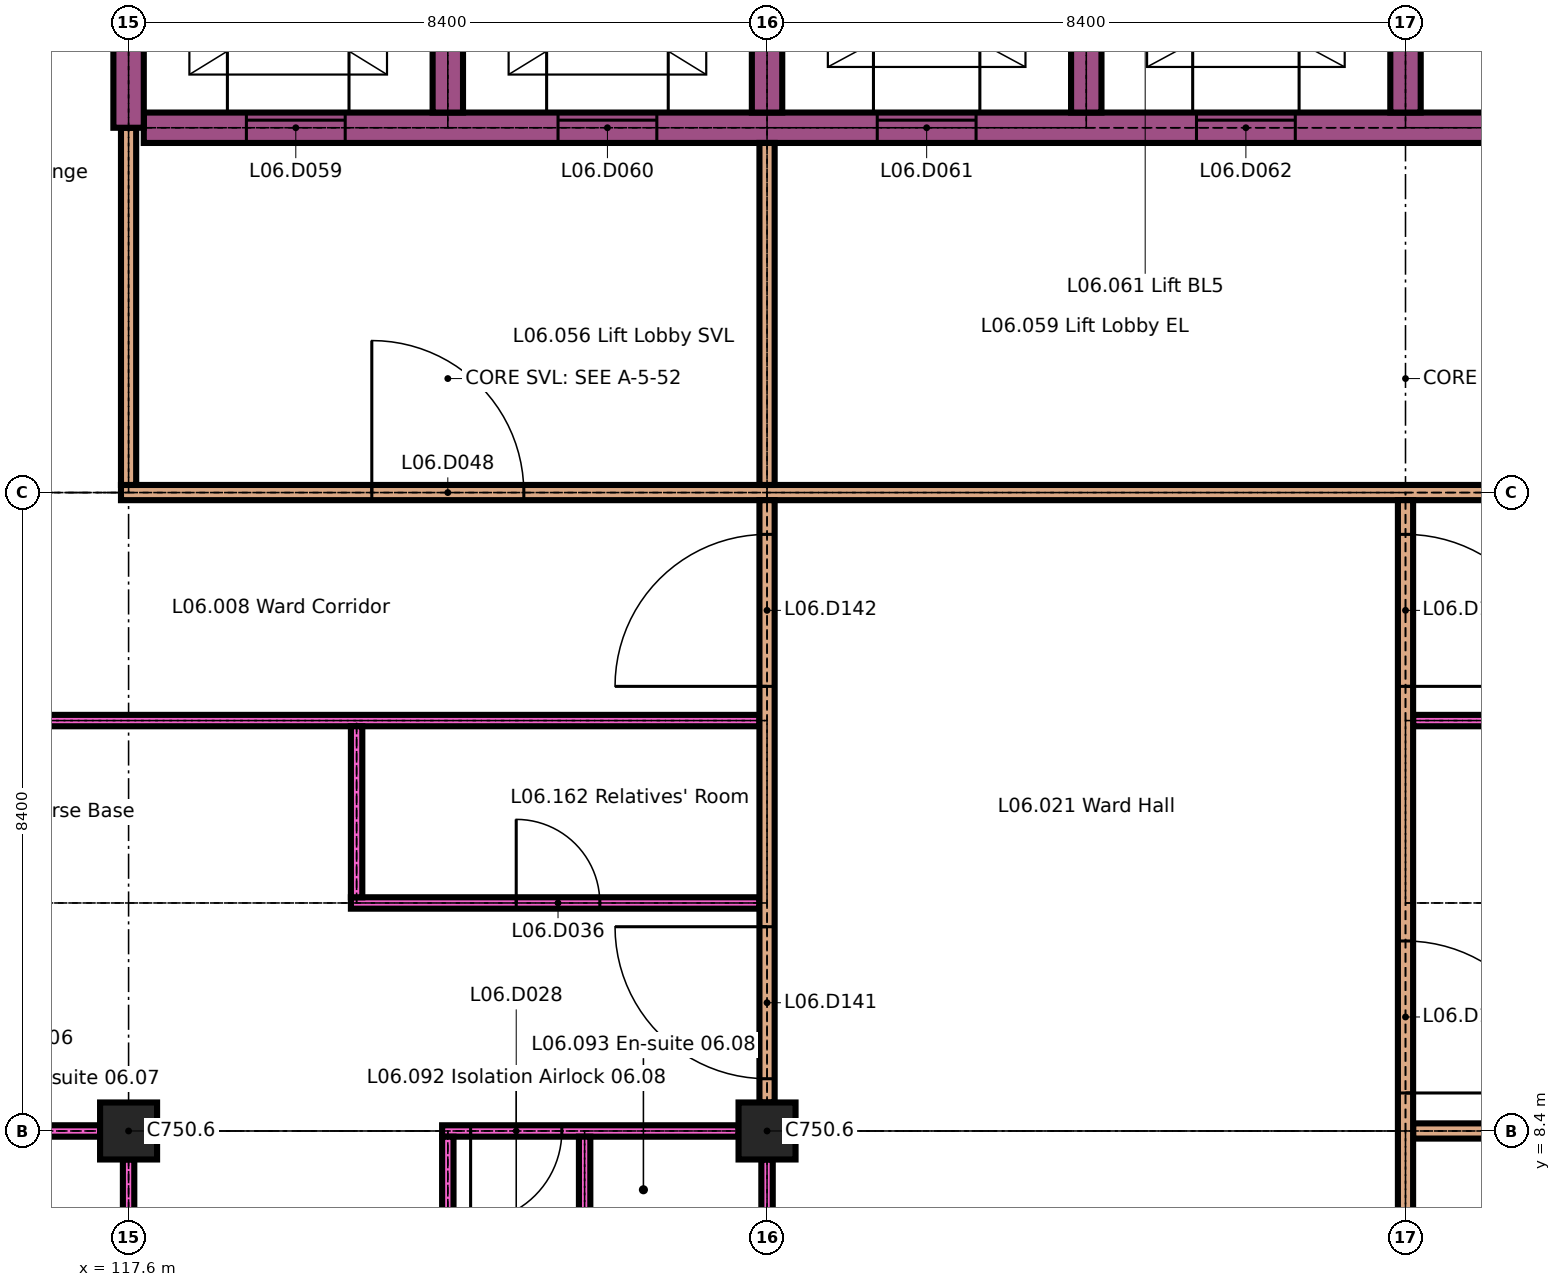
"""IFC4 building model, lengths in metres.
Left out: names, types, materials, properties, quantities, classifications, styles, units other than length and angle.
Written with IfcOpenShell. Run it as: python <this file> out.ifc"""

import sys

from ifc_helpers import new_model, si_unit, direction, frame, frame_2d, origin, origin_2d, place, context, subcontext, project, spatial, rectangle, extrude, element, fill, save


model = new_model("IFC4")
c1 = context("Model", 3, precision=1e-05, world=origin(), true_north=direction((0.0, 1.0)))
c2 = subcontext(c1, "Body", "Model", "MODEL_VIEW")
j1 = project(units=[si_unit("LENGTHUNIT", "METRE"), si_unit("PLANEANGLEUNIT", "RADIAN")], contexts=[c1])
p1 = place(None, origin())
s1 = spatial("IfcSite", under=j1, at=p1, CompositionType="ELEMENT")
p2 = place(p1, origin())
s2 = spatial("IfcBuilding", under=s1, at=p2, CompositionType="ELEMENT")
p3 = place(p2, frame((0.0, 0.0, 26.1)))
s3 = spatial("IfcBuildingStorey", under=s2, at=p3, CompositionType="ELEMENT", Elevation=26.1)
for number, where, z_axis, x_axis in (
    (1, (117.6, 8.4, 0.0), (0.0, 0.0, 1.0), (1.0, 0.0, 0.0)),
    (2, (126.0, 8.4, 0.0), (0.0, 0.0, 1.0), (1.0, 0.0, 0.0)),
):
    element("IfcColumn", number, at=place(p3, frame(where, z_axis=z_axis, x_axis=x_axis)), inside=s3, PredefinedType="COLUMN", context=c2, shape_type="SweptSolid", body=[
        extrude(rectangle(XDim=0.75, YDim=0.75, at=origin_2d()), origin(), (0.0, 0.0, 1.0), 3.3),
    ])
p4 = place(p3, frame((109.2, 8.4, 0.0), z_axis=(0.0, 0.0, 1.0), x_axis=(1.0, 0.0, 0.0)))
e3 = element("IfcWall", 3, at=p4, inside=s3, PredefinedType="PARTITIONING", context=c2, shape_type="SweptSolid", body=[
    extrude(rectangle(XDim=8.025, YDim=0.15, at=frame_2d((4.013, 0.0))), origin(), (0.0, 0.0, 1.0), 3.3),
])
p5 = place(p4, frame((2.7, 0.0, 0.0)))
e4 = element("IfcOpeningElement", 4, at=p5, cuts=e3, PredefinedType="OPENING", context=c2, shape_type="SweptSolid", body=[
    extrude(rectangle(XDim=1.2, YDim=2.1, at=frame_2d((0.6, 1.05))), frame((0.0, 0.085, 0.0), z_axis=(0.0, -1.0, 0.0), x_axis=(1.0, 0.0, 0.0)), (0.0, 0.0, 1.0), 0.17),
])
p6 = place(p4, frame((4.45, 0.0, 0.0)))
e5 = element("IfcOpeningElement", 5, at=p6, cuts=e3, PredefinedType="OPENING", context=c2, shape_type="SweptSolid", body=[
    extrude(rectangle(XDim=1.5, YDim=2.4, at=frame_2d((0.75, 1.2))), frame((0.0, 0.085, 0.0), z_axis=(0.0, -1.0, 0.0), x_axis=(1.0, 0.0, 0.0)), (0.0, 0.0, 1.0), 0.17),
])
p7 = place(p3, frame((121.725, 8.4, 0.0), z_axis=(0.0, 0.0, 1.0), x_axis=(1.0, 0.0, 0.0)))
e6 = element("IfcWall", 6, at=p7, inside=s3, PredefinedType="PARTITIONING", context=c2, shape_type="SweptSolid", body=[
    extrude(rectangle(XDim=3.9, YDim=0.15, at=frame_2d((1.95, 0.0))), origin(), (0.0, 0.0, 1.0), 3.3),
])
p8 = place(p7, frame((0.375, 0.0, 0.0)))
e7 = element("IfcOpeningElement", 7, at=p8, cuts=e6, PredefinedType="OPENING", context=c2, shape_type="SweptSolid", body=[
    extrude(rectangle(XDim=1.2, YDim=2.1, at=frame_2d((0.6, 1.05))), frame((0.0, 0.085, 0.0), z_axis=(0.0, -1.0, 0.0), x_axis=(1.0, 0.0, 0.0)), (0.0, 0.0, 1.0), 0.17),
])
p9 = place(p3, frame((134.5, 8.4, 0.0), z_axis=(0.0, 0.0, 1.0), x_axis=(1.0, 0.0, 0.0)))
e8 = element("IfcWall", 8, at=p9, inside=s3, PredefinedType="PARTITIONING", context=c2, shape_type="SweptSolid", body=[
    extrude(rectangle(XDim=8.3, YDim=0.2, at=frame_2d((4.15, 0.0))), origin(), (0.0, 0.0, 1.0), 3.3),
])
p10 = place(p9, frame((3.15, 0.0, 0.0)))
e9 = element("IfcOpeningElement", 9, at=p10, cuts=e8, PredefinedType="OPENING", context=c2, shape_type="SweptSolid", body=[
    extrude(rectangle(XDim=2.0, YDim=2.4, at=frame_2d((1.0, 1.2))), frame((0.0, 0.11, 0.0), z_axis=(0.0, -1.0, 0.0), x_axis=(1.0, 0.0, 0.0)), (0.0, 0.0, 1.0), 0.22),
])
p11 = place(p3, frame((120.525, 11.4, 0.0), z_axis=(0.0, 0.0, 1.0), x_axis=(1.0, 0.0, 0.0)))
e10 = element("IfcWall", 10, at=p11, inside=s3, PredefinedType="PARTITIONING", context=c2, shape_type="SweptSolid", body=[
    extrude(rectangle(XDim=5.375, YDim=0.15, at=frame_2d((2.688, 0.0))), origin(), (0.0, 0.0, 1.0), 3.3),
])
p12 = place(p11, frame((2.175, 0.0, 0.0)))
e11 = element("IfcOpeningElement", 11, at=p12, cuts=e10, PredefinedType="OPENING", context=c2, shape_type="SweptSolid", body=[
    extrude(rectangle(XDim=1.1, YDim=2.1, at=frame_2d((0.55, 1.05))), frame((0.0, 0.085, 0.0), z_axis=(0.0, -1.0, 0.0), x_axis=(1.0, 0.0, 0.0)), (0.0, 0.0, 1.0), 0.17),
])
p13 = place(p3, frame((112.125, 13.8, 0.0), z_axis=(0.0, 0.0, 1.0), x_axis=(1.0, 0.0, 0.0)))
e12 = element("IfcWall", 12, at=p13, inside=s3, PredefinedType="PARTITIONING", context=c2, shape_type="SweptSolid", body=[
    extrude(rectangle(XDim=13.775, YDim=0.15, at=frame_2d((6.887, 0.0))), origin(), (0.0, 0.0, 1.0), 3.3),
])
p14 = place(p3, frame((134.5, 13.8, 0.0), z_axis=(0.0, 0.0, 1.0), x_axis=(1.0, 0.0, 0.0)))
e13 = element("IfcWall", 13, at=p14, inside=s3, PredefinedType="PARTITIONING", context=c2, shape_type="SweptSolid", body=[
    extrude(rectangle(XDim=16.6, YDim=0.15, at=frame_2d((8.3, 0.0))), origin(), (0.0, 0.0, 1.0), 3.3),
])
p15 = place(p14, frame((9.8, 0.0, 0.0)))
e14 = element("IfcOpeningElement", 14, at=p15, cuts=e13, PredefinedType="OPENING", context=c2, shape_type="SweptSolid", body=[
    extrude(rectangle(XDim=1.2, YDim=2.1, at=frame_2d((0.6, 1.05))), frame((0.0, 0.085, 0.0), z_axis=(0.0, -1.0, 0.0), x_axis=(1.0, 0.0, 0.0)), (0.0, 0.0, 1.0), 0.17),
])
p16 = place(p14, frame((13.95, 0.0, 0.0)))
e15 = element("IfcOpeningElement", 15, at=p16, cuts=e13, PredefinedType="OPENING", context=c2, shape_type="SweptSolid", body=[
    extrude(rectangle(XDim=1.2, YDim=2.1, at=frame_2d((0.6, 1.05))), frame((0.0, 0.085, 0.0), z_axis=(0.0, -1.0, 0.0), x_axis=(1.0, 0.0, 0.0)), (0.0, 0.0, 1.0), 0.17),
])
p17 = place(p3, frame((117.5, 16.8, 0.0), z_axis=(0.0, 0.0, 1.0), x_axis=(1.0, 0.0, 0.0)))
e16 = element("IfcWall", 16, at=p17, inside=s3, PredefinedType="PARTITIONING", context=c2, shape_type="SweptSolid", body=[
    extrude(rectangle(XDim=25.3, YDim=0.2, at=frame_2d((12.65, 0.0))), origin(), (0.0, 0.0, 1.0), 3.3),
])
p18 = place(p17, frame((3.3, 0.0, 0.0)))
e17 = element("IfcOpeningElement", 17, at=p18, cuts=e16, PredefinedType="OPENING", context=c2, shape_type="SweptSolid", body=[
    extrude(rectangle(XDim=2.0, YDim=2.4, at=frame_2d((1.0, 1.2))), frame((0.0, 0.11, 0.0), z_axis=(0.0, -1.0, 0.0), x_axis=(1.0, 0.0, 0.0)), (0.0, 0.0, 1.0), 0.22),
])
p19 = place(p17, frame((20.1, 0.0, 0.0)))
e18 = element("IfcOpeningElement", 18, at=p19, cuts=e16, PredefinedType="OPENING", context=c2, shape_type="SweptSolid", body=[
    extrude(rectangle(XDim=2.0, YDim=2.4, at=frame_2d((1.0, 1.2))), frame((0.0, 0.11, 0.0), z_axis=(0.0, -1.0, 0.0), x_axis=(1.0, 0.0, 0.0)), (0.0, 0.0, 1.0), 0.22),
])
p20 = place(p3, frame((117.8, 21.6, 0.0), z_axis=(0.0, 0.0, 1.0), x_axis=(1.0, 0.0, 0.0)))
e19 = element("IfcWall", 19, at=p20, inside=s3, PredefinedType="SHEAR", context=c2, shape_type="SweptSolid", body=[
    extrude(rectangle(XDim=24.8, YDim=0.4, at=frame_2d((12.4, 0.0))), origin(), (0.0, 0.0, 1.0), 3.3),
])
p21 = place(p20, frame((1.35, 0.0, 0.0)))
e20 = element("IfcOpeningElement", 20, at=p21, cuts=e19, PredefinedType="OPENING", context=c2, shape_type="SweptSolid", body=[
    extrude(rectangle(XDim=1.3, YDim=2.1, at=frame_2d((0.65, 1.05))), frame((0.0, 0.21, 0.0), z_axis=(0.0, -1.0, 0.0), x_axis=(1.0, 0.0, 0.0)), (0.0, 0.0, 1.0), 0.42),
])
p22 = place(p20, frame((5.45, 0.0, 0.0)))
e21 = element("IfcOpeningElement", 21, at=p22, cuts=e19, PredefinedType="OPENING", context=c2, shape_type="SweptSolid", body=[
    extrude(rectangle(XDim=1.3, YDim=2.1, at=frame_2d((0.65, 1.05))), frame((0.0, 0.21, 0.0), z_axis=(0.0, -1.0, 0.0), x_axis=(1.0, 0.0, 0.0)), (0.0, 0.0, 1.0), 0.42),
])
p23 = place(p20, frame((9.65, 0.0, 0.0)))
e22 = element("IfcOpeningElement", 22, at=p23, cuts=e19, PredefinedType="OPENING", context=c2, shape_type="SweptSolid", body=[
    extrude(rectangle(XDim=1.3, YDim=2.1, at=frame_2d((0.65, 1.05))), frame((0.0, 0.21, 0.0), z_axis=(0.0, -1.0, 0.0), x_axis=(1.0, 0.0, 0.0)), (0.0, 0.0, 1.0), 0.42),
])
p24 = place(p20, frame((13.85, 0.0, 0.0)))
e23 = element("IfcOpeningElement", 23, at=p24, cuts=e19, PredefinedType="OPENING", context=c2, shape_type="SweptSolid", body=[
    extrude(rectangle(XDim=1.3, YDim=2.1, at=frame_2d((0.65, 1.05))), frame((0.0, 0.21, 0.0), z_axis=(0.0, -1.0, 0.0), x_axis=(1.0, 0.0, 0.0)), (0.0, 0.0, 1.0), 0.42),
])
p25 = place(p20, frame((18.15, 0.0, 0.0)))
e24 = element("IfcOpeningElement", 24, at=p25, cuts=e19, PredefinedType="OPENING", context=c2, shape_type="SweptSolid", body=[
    extrude(rectangle(XDim=1.1, YDim=2.1, at=frame_2d((0.55, 1.05))), frame((0.0, 0.21, 0.0), z_axis=(0.0, -1.0, 0.0), x_axis=(1.0, 0.0, 0.0)), (0.0, 0.0, 1.0), 0.42),
])
p26 = place(p20, frame((22.25, 0.0, 0.0)))
e25 = element("IfcOpeningElement", 25, at=p26, cuts=e19, PredefinedType="OPENING", context=c2, shape_type="SweptSolid", body=[
    extrude(rectangle(XDim=1.1, YDim=2.1, at=frame_2d((0.55, 1.05))), frame((0.0, 0.21, 0.0), z_axis=(0.0, -1.0, 0.0), x_axis=(1.0, 0.0, 0.0)), (0.0, 0.0, 1.0), 0.42),
])
p27 = place(p3, frame((117.6, 0.375, 0.0), z_axis=(0.0, 0.0, 1.0), x_axis=(0.0, 1.0, 0.0)))
e26 = element("IfcWall", 26, at=p27, inside=s3, PredefinedType="PARTITIONING", context=c2, shape_type="SweptSolid", body=[
    extrude(rectangle(XDim=7.65, YDim=0.15, at=frame_2d((3.825, 0.0))), origin(), (0.0, 0.0, 1.0), 3.3),
])
p28 = place(p3, frame((117.6, 16.9, 0.0), z_axis=(0.0, 0.0, 1.0), x_axis=(0.0, 1.0, 0.0)))
e27 = element("IfcWall", 27, at=p28, inside=s3, PredefinedType="PARTITIONING", context=c2, shape_type="SweptSolid", body=[
    extrude(rectangle(XDim=4.7, YDim=0.2, at=frame_2d((2.35, 0.0))), origin(), (0.0, 0.0, 1.0), 3.3),
])
p29 = place(p3, frame((117.6, 21.6, 0.0), z_axis=(0.0, 0.0, 1.0), x_axis=(0.0, 1.0, 0.0)))
e28 = element("IfcWall", 28, at=p29, inside=s3, PredefinedType="SHEAR", context=c2, shape_type="SweptSolid", body=[
    extrude(rectangle(XDim=3.45, YDim=0.4, at=frame_2d((1.725, 0.0))), origin(), (0.0, 0.0, 1.0), 3.3),
])
p30 = place(p3, frame((120.6, 11.475, 0.0), z_axis=(0.0, 0.0, 1.0), x_axis=(0.0, 1.0, 0.0)))
e29 = element("IfcWall", 29, at=p30, inside=s3, PredefinedType="PARTITIONING", context=c2, shape_type="SweptSolid", body=[
    extrude(rectangle(XDim=2.25, YDim=0.15, at=frame_2d((1.125, 0.0))), origin(), (0.0, 0.0, 1.0), 3.3),
])
p31 = place(p3, frame((121.8, 0.15, 0.0), z_axis=(0.0, 0.0, 1.0), x_axis=(0.0, 1.0, 0.0)))
e30 = element("IfcWall", 30, at=p31, inside=s3, PredefinedType="PARTITIONING", context=c2, shape_type="SweptSolid", body=[
    extrude(rectangle(XDim=8.175, YDim=0.15, at=frame_2d((4.087, 0.0))), origin(), (0.0, 0.0, 1.0), 3.3),
])
p32 = place(p3, frame((121.8, 21.8, 0.0), z_axis=(0.0, 0.0, 1.0), x_axis=(0.0, 1.0, 0.0)))
e31 = element("IfcWall", 31, at=p32, inside=s3, PredefinedType="SHEAR", context=c2, shape_type="SweptSolid", body=[
    extrude(rectangle(XDim=3.25, YDim=0.4, at=frame_2d((1.625, 0.0))), origin(), (0.0, 0.0, 1.0), 3.3),
])
p33 = place(p3, frame((123.6, 6.075, 0.0), z_axis=(0.0, 0.0, 1.0), x_axis=(0.0, 1.0, 0.0)))
e32 = element("IfcWall", 32, at=p33, inside=s3, PredefinedType="PARTITIONING", context=c2, shape_type="SweptSolid", body=[
    extrude(rectangle(XDim=2.25, YDim=0.15, at=frame_2d((1.125, 0.0))), origin(), (0.0, 0.0, 1.0), 3.3),
])
p34 = place(p3, frame((126.0, 0.375, 0.0), z_axis=(0.0, 0.0, 1.0), x_axis=(0.0, 1.0, 0.0)))
e33 = element("IfcWall", 33, at=p34, inside=s3, PredefinedType="PARTITIONING", context=c2, shape_type="SweptSolid", body=[
    extrude(rectangle(XDim=7.65, YDim=0.15, at=frame_2d((3.825, 0.0))), origin(), (0.0, 0.0, 1.0), 3.3),
])
p35 = place(p3, frame((126.0, 8.775, 0.0), z_axis=(0.0, 0.0, 1.0), x_axis=(0.0, 1.0, 0.0)))
e34 = element("IfcWall", 34, at=p35, inside=s3, PredefinedType="PARTITIONING", context=c2, shape_type="SweptSolid", body=[
    extrude(rectangle(XDim=7.925, YDim=0.2, at=frame_2d((3.962, 0.0))), origin(), (0.0, 0.0, 1.0), 3.3),
])
p36 = place(p35, frame((0.312, 0.0, 0.0)))
e35 = element("IfcOpeningElement", 35, at=p36, cuts=e34, PredefinedType="OPENING", context=c2, shape_type="SweptSolid", body=[
    extrude(rectangle(XDim=2.0, YDim=2.4, at=frame_2d((1.0, 1.2))), frame((0.0, 0.11, 0.0), z_axis=(0.0, -1.0, 0.0), x_axis=(1.0, 0.0, 0.0)), (0.0, 0.0, 1.0), 0.22),
])
p37 = place(p35, frame((5.475, 0.0, 0.0)))
e36 = element("IfcOpeningElement", 36, at=p37, cuts=e34, PredefinedType="OPENING", context=c2, shape_type="SweptSolid", body=[
    extrude(rectangle(XDim=2.0, YDim=2.4, at=frame_2d((1.0, 1.2))), frame((0.0, 0.11, 0.0), z_axis=(0.0, -1.0, 0.0), x_axis=(1.0, 0.0, 0.0)), (0.0, 0.0, 1.0), 0.22),
])
p38 = place(p3, frame((126.0, 16.9, 0.0), z_axis=(0.0, 0.0, 1.0), x_axis=(0.0, 1.0, 0.0)))
e37 = element("IfcWall", 37, at=p38, inside=s3, PredefinedType="PARTITIONING", context=c2, shape_type="SweptSolid", body=[
    extrude(rectangle(XDim=4.5, YDim=0.2, at=frame_2d((2.25, 0.0))), origin(), (0.0, 0.0, 1.0), 3.3),
])
for number, where, z_axis, x_axis in (
    (38, (126.0, 21.8, 0.0), (0.0, 0.0, 1.0), (0.0, 1.0, 0.0)),
    (39, (130.2, 21.8, 0.0), (0.0, 0.0, 1.0), (0.0, 1.0, 0.0)),
):
    element("IfcWall", number, at=place(p3, frame(where, z_axis=z_axis, x_axis=x_axis)), inside=s3, PredefinedType="SHEAR", context=c2, shape_type="SweptSolid", body=[
        extrude(rectangle(XDim=3.25, YDim=0.4, at=frame_2d((1.625, 0.0))), origin(), (0.0, 0.0, 1.0), 3.3),
    ])
p39 = place(p3, frame((134.4, 3.6, 0.0), z_axis=(0.0, 0.0, 1.0), x_axis=(0.0, 1.0, 0.0)))
e40 = element("IfcWall", 40, at=p39, inside=s3, PredefinedType="PARTITIONING", context=c2, shape_type="SweptSolid", body=[
    extrude(rectangle(XDim=13.1, YDim=0.2, at=frame_2d((6.55, 0.0))), origin(), (0.0, 0.0, 1.0), 3.3),
])
p40 = place(p39, frame((5.3, 0.0, 0.0)))
e41 = element("IfcOpeningElement", 41, at=p40, cuts=e40, PredefinedType="OPENING", context=c2, shape_type="SweptSolid", body=[
    extrude(rectangle(XDim=2.0, YDim=2.4, at=frame_2d((1.0, 1.2))), frame((0.0, 0.11, 0.0), z_axis=(0.0, -1.0, 0.0), x_axis=(1.0, 0.0, 0.0)), (0.0, 0.0, 1.0), 0.22),
])
p41 = place(p39, frame((10.65, 0.0, 0.0)))
e42 = element("IfcOpeningElement", 42, at=p41, cuts=e40, PredefinedType="OPENING", context=c2, shape_type="SweptSolid", body=[
    extrude(rectangle(XDim=2.0, YDim=2.4, at=frame_2d((1.0, 1.2))), frame((0.0, 0.11, 0.0), z_axis=(0.0, -1.0, 0.0), x_axis=(1.0, 0.0, 0.0)), (0.0, 0.0, 1.0), 0.22),
])
p42 = place(p3, frame((134.4, 21.8, 0.0), z_axis=(0.0, 0.0, 1.0), x_axis=(0.0, 1.0, 0.0)))
e43 = element("IfcWall", 43, at=p42, inside=s3, PredefinedType="SHEAR", context=c2, shape_type="SweptSolid", body=[
    extrude(rectangle(XDim=3.25, YDim=0.4, at=frame_2d((1.625, 0.0))), origin(), (0.0, 0.0, 1.0), 3.3),
])
p43 = place(p8, origin())
e44 = element("IfcDoor", 44, at=p43, inside=s3, OperationType="SINGLE_SWING_LEFT", PredefinedType="DOOR", context=c2, shape_type="SweptSolid", body=[
    extrude(rectangle(XDim=1.2, YDim=2.1, at=frame_2d((0.6, 1.05))), frame((0.0, 0.05, 0.0), z_axis=(0.0, -1.0, 0.0), x_axis=(1.0, 0.0, 0.0)), (0.0, 0.0, 1.0), 0.1),
])
fill(e7, e44)
p44 = place(p12, origin())
e45 = element("IfcDoor", 45, at=p44, inside=s3, OperationType="SINGLE_SWING_RIGHT", PredefinedType="DOOR", context=c2, shape_type="SweptSolid", body=[
    extrude(rectangle(XDim=1.1, YDim=2.1, at=frame_2d((0.55, 1.05))), frame((0.0, 0.025, 0.0), z_axis=(0.0, -1.0, 0.0), x_axis=(1.0, 0.0, 0.0)), (0.0, 0.0, 1.0), 0.05),
])
fill(e11, e45)
p45 = place(p18, origin())
e46 = element("IfcDoor", 46, at=p45, inside=s3, OperationType="SINGLE_SWING_RIGHT", PredefinedType="DOOR", context=c2, shape_type="SweptSolid", body=[
    extrude(rectangle(XDim=2.0, YDim=2.4, at=frame_2d((1.0, 1.2))), frame((0.0, 0.03, 0.0), z_axis=(0.0, -1.0, 0.0), x_axis=(1.0, 0.0, 0.0)), (0.0, 0.0, 1.0), 0.06),
])
fill(e17, e46)
p46 = place(p21, origin())
e47 = element("IfcDoor", 47, at=p46, inside=s3, OperationType="SLIDING_TO_LEFT", PredefinedType="DOOR", context=c2, shape_type="SweptSolid", body=[
    extrude(rectangle(XDim=1.3, YDim=2.1, at=frame_2d((0.65, 1.05))), frame((0.0, 0.025, 0.0), z_axis=(0.0, -1.0, 0.0), x_axis=(1.0, 0.0, 0.0)), (0.0, 0.0, 1.0), 0.05),
])
fill(e20, e47)
p47 = place(p22, origin())
e48 = element("IfcDoor", 48, at=p47, inside=s3, OperationType="SLIDING_TO_LEFT", PredefinedType="DOOR", context=c2, shape_type="SweptSolid", body=[
    extrude(rectangle(XDim=1.3, YDim=2.1, at=frame_2d((0.65, 1.05))), frame((0.0, 0.025, 0.0), z_axis=(0.0, -1.0, 0.0), x_axis=(1.0, 0.0, 0.0)), (0.0, 0.0, 1.0), 0.05),
])
fill(e21, e48)
p48 = place(p23, origin())
e49 = element("IfcDoor", 49, at=p48, inside=s3, OperationType="SLIDING_TO_LEFT", PredefinedType="DOOR", context=c2, shape_type="SweptSolid", body=[
    extrude(rectangle(XDim=1.3, YDim=2.1, at=frame_2d((0.65, 1.05))), frame((0.0, 0.025, 0.0), z_axis=(0.0, -1.0, 0.0), x_axis=(1.0, 0.0, 0.0)), (0.0, 0.0, 1.0), 0.05),
])
fill(e22, e49)
p49 = place(p24, origin())
e50 = element("IfcDoor", 50, at=p49, inside=s3, OperationType="SLIDING_TO_LEFT", PredefinedType="DOOR", context=c2, shape_type="SweptSolid", body=[
    extrude(rectangle(XDim=1.3, YDim=2.1, at=frame_2d((0.65, 1.05))), frame((0.0, 0.025, 0.0), z_axis=(0.0, -1.0, 0.0), x_axis=(1.0, 0.0, 0.0)), (0.0, 0.0, 1.0), 0.05),
])
fill(e23, e50)
p50 = place(p36, origin())
e51 = element("IfcDoor", 51, at=p50, inside=s3, OperationType="SINGLE_SWING_LEFT", PredefinedType="DOOR", context=c2, shape_type="SweptSolid", body=[
    extrude(rectangle(XDim=2.0, YDim=2.4, at=frame_2d((1.0, 1.2))), frame((0.0, 0.03, 0.0), z_axis=(0.0, -1.0, 0.0), x_axis=(1.0, 0.0, 0.0)), (0.0, 0.0, 1.0), 0.06),
])
fill(e35, e51)
p51 = place(p37, origin())
e52 = element("IfcDoor", 52, at=p51, inside=s3, OperationType="SINGLE_SWING_RIGHT", PredefinedType="DOOR", context=c2, shape_type="SweptSolid", body=[
    extrude(rectangle(XDim=2.0, YDim=2.4, at=frame_2d((1.0, 1.2))), frame((0.0, 0.03, 0.0), z_axis=(0.0, -1.0, 0.0), x_axis=(1.0, 0.0, 0.0)), (0.0, 0.0, 1.0), 0.06),
])
fill(e36, e52)
p52 = place(p40, origin())
e53 = element("IfcDoor", 53, at=p52, inside=s3, OperationType="SINGLE_SWING_LEFT", PredefinedType="DOOR", context=c2, shape_type="SweptSolid", body=[
    extrude(rectangle(XDim=2.0, YDim=2.4, at=frame_2d((1.0, 1.2))), frame((0.0, 0.03, 0.0), z_axis=(0.0, -1.0, 0.0), x_axis=(1.0, 0.0, 0.0)), (0.0, 0.0, 1.0), 0.06),
])
fill(e41, e53)
p53 = place(p41, origin())
e54 = element("IfcDoor", 54, at=p53, inside=s3, OperationType="SINGLE_SWING_LEFT", PredefinedType="DOOR", context=c2, shape_type="SweptSolid", body=[
    extrude(rectangle(XDim=2.0, YDim=2.4, at=frame_2d((1.0, 1.2))), frame((0.0, 0.03, 0.0), z_axis=(0.0, -1.0, 0.0), x_axis=(1.0, 0.0, 0.0)), (0.0, 0.0, 1.0), 0.06),
])
fill(e42, e54)
save(model, sys.argv[1])
